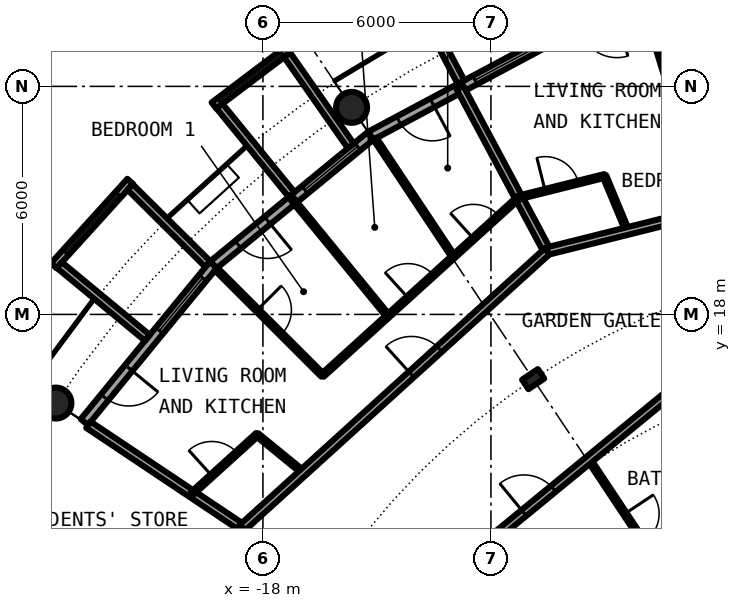
"""IFC4 building model, lengths in metres.
Left out: names, types, materials, properties, quantities, classifications, styles, units other than length and angle.
Written with IfcOpenShell. Run it as: python <this file> out.ifc"""

import sys

from ifc_helpers import new_model, si_unit, direction, frame, frame_2d, origin, origin_2d, place, context, subcontext, project, spatial, rectangle, circle, hollow_circle, i_section, extrude, element, fill, save


model = new_model("IFC4")
c1 = context("Model", 3, precision=1e-05, world=origin(), true_north=direction((0.0, 1.0)))
c2 = subcontext(c1, "Body", "Model", "MODEL_VIEW")
j1 = project(units=[si_unit("LENGTHUNIT", "METRE"), si_unit("PLANEANGLEUNIT", "RADIAN")], contexts=[c1])
p1 = place(None, origin())
s1 = spatial("IfcSite", under=j1, at=p1, CompositionType="ELEMENT")
p2 = place(p1, origin())
s2 = spatial("IfcBuilding", under=s1, at=p2, CompositionType="ELEMENT")
p3 = place(p2, frame((0.0, 0.0, 161.6)))
s3 = spatial("IfcBuildingStorey", under=s2, at=p3, CompositionType="ELEMENT", Elevation=161.6)
for number, where, z_axis, x_axis in (
    (1, (-15.667, 23.448, 0.0), (0.0, 0.0, 1.0), (1.0, 0.0, 0.0)),
    (2, (-23.448, 15.667, 0.0), (0.0, 0.0, 1.0), (1.0, 0.0, 0.0)),
):
    element("IfcColumn", number, at=place(p3, frame(where, z_axis=z_axis, x_axis=x_axis)), inside=s3, PredefinedType="COLUMN", context=c2, shape_type="SweptSolid", body=[
        extrude(hollow_circle(Radius=0.406, WallThickness=0.04, at=origin_2d()), origin(), (0.0, 0.0, 1.0), 3.05),
    ])
p4 = place(p3, frame((-10.889, 16.297, 0.0), z_axis=(0.0, 0.0, 1.0), x_axis=(-0.55557023302, 0.831469612303, 0.0)))
e3 = element("IfcColumn", 3, at=p4, inside=s3, PredefinedType="COLUMN", context=c2, shape_type="SweptSolid", body=[
    extrude(i_section(OverallWidth=0.3, OverallDepth=0.5, WebThickness=0.014, FlangeThickness=0.028, FilletRadius=0.027, at=origin_2d()), origin(), (0.0, 0.0, 1.0), 3.05),
])
p5 = place(p3, frame((-10.447, 25.222, 0.0), z_axis=(0.0, 0.0, 1.0), x_axis=(-0.881915646801, -0.471407246368, 0.0)))
e4 = element("IfcWall", 4, at=p5, inside=s3, PredefinedType="SOLIDWALL", context=c2, shape_type="SweptSolid", body=[
    extrude(rectangle(XDim=5.352, YDim=0.25, at=frame_2d((2.676, 0.0))), origin(), (0.0, 0.0, 1.0), 2.7),
])
p6 = place(p5, frame((0.441, 0.0, 0.3)))
e5 = element("IfcOpeningElement", 5, at=p6, cuts=e4, PredefinedType="OPENING", context=c2, shape_type="SweptSolid", body=[
    extrude(rectangle(XDim=1.8, YDim=2.1, at=frame_2d((0.9, 1.05))), frame((0.0, 0.135, 0.0), z_axis=(0.0, -1.0, 0.0), x_axis=(1.0, 0.0, 0.0)), (0.0, 0.0, 1.0), 0.27),
])
p7 = place(p5, frame((3.51, 0.0, 0.0)))
e6 = element("IfcOpeningElement", 6, at=p7, cuts=e4, PredefinedType="OPENING", context=c2, shape_type="SweptSolid", body=[
    extrude(rectangle(XDim=1.0, YDim=2.2, at=frame_2d((0.5, 1.1))), frame((0.0, 0.135, 0.0), z_axis=(0.0, -1.0, 0.0), x_axis=(1.0, 0.0, 0.0)), (0.0, 0.0, 1.0), 0.27),
])
p8 = place(p3, frame((-12.787, 24.113, -0.03), z_axis=(0.0, 0.0, 1.0), x_axis=(-0.468365282436, 0.883534924159, 0.0)))
e7 = element("IfcWall", 7, at=p8, inside=s3, PredefinedType="SOLIDWALL", context=c2, shape_type="SweptSolid", body=[
    extrude(rectangle(XDim=3.006, YDim=0.2, at=frame_2d((1.503, 0.0))), origin(), (0.0, 0.0, 1.0), 2.73),
])
p9 = place(p3, frame((-15.167, 22.699, 0.0), z_axis=(0.0, 0.0, 1.0), x_axis=(-0.773019449054, -0.634382322723, 0.0)))
e8 = element("IfcWall", 8, at=p9, inside=s3, PredefinedType="SOLIDWALL", context=c2, shape_type="SweptSolid", body=[
    extrude(rectangle(XDim=5.352, YDim=0.25, at=frame_2d((2.676, 0.0))), origin(), (0.0, 0.0, 1.0), 2.7),
])
p10 = place(p9, frame((0.441, 0.0, 0.3)))
e9 = element("IfcOpeningElement", 9, at=p10, cuts=e8, PredefinedType="OPENING", context=c2, shape_type="SweptSolid", body=[
    extrude(rectangle(XDim=1.8, YDim=2.1, at=frame_2d((0.9, 1.05))), frame((0.0, 0.135, 0.0), z_axis=(0.0, -1.0, 0.0), x_axis=(1.0, 0.0, 0.0)), (0.0, 0.0, 1.0), 0.27),
])
p11 = place(p9, frame((3.51, 0.0, 0.0)))
e10 = element("IfcOpeningElement", 10, at=p11, cuts=e8, PredefinedType="OPENING", context=c2, shape_type="SweptSolid", body=[
    extrude(rectangle(XDim=1.0, YDim=2.2, at=frame_2d((0.5, 1.1))), frame((0.0, 0.135, 0.0), z_axis=(0.0, -1.0, 0.0), x_axis=(1.0, 0.0, 0.0)), (0.0, 0.0, 1.0), 0.27),
])
p12 = place(p3, frame((-17.337, 24.972, -0.03), z_axis=(0.0, 0.0, 1.0), x_axis=(-0.797887588059, -0.602806268067, 0.0)))
e11 = element("IfcWall", 11, at=p12, inside=s3, PredefinedType="SOLIDWALL", context=c2, shape_type="SweptSolid", body=[
    extrude(rectangle(XDim=2.447, YDim=0.2, at=frame_2d((1.223, 0.0))), origin(), (0.0, 0.0, 1.0), 2.73),
])
p13 = place(p12, frame((0.183, 0.0, 0.33)))
e12 = element("IfcOpeningElement", 12, at=p13, cuts=e11, PredefinedType="OPENING", context=c2, shape_type="SweptSolid", body=[
    extrude(circle(Radius=1.04, at=frame_2d((1.04, 1.04))), frame((0.0, 0.11, 0.0), z_axis=(0.0, -1.0, 0.0), x_axis=(1.0, 0.0, 0.0)), (0.0, 0.0, 1.0), 0.22),
])
p14 = place(p3, frame((-15.688, 22.433, -0.03), z_axis=(0.0, 0.0, 1.0), x_axis=(-0.573260687834, 0.819373043115, 0.0)))
e13 = element("IfcWall", 13, at=p14, inside=s3, PredefinedType="SOLIDWALL", context=c2, shape_type="SweptSolid", body=[
    extrude(rectangle(XDim=2.925, YDim=0.2, at=frame_2d((1.463, 0.0))), origin(), (0.0, 0.0, 1.0), 2.73),
])
p15 = place(p3, frame((-17.246, 21.155, -0.03), z_axis=(0.0, 0.0, 1.0), x_axis=(-0.631741648902, 0.775179004516, 0.0)))
e14 = element("IfcWall", 14, at=p15, inside=s3, PredefinedType="SOLIDWALL", context=c2, shape_type="SweptSolid", body=[
    extrude(rectangle(XDim=3.006, YDim=0.2, at=frame_2d((1.503, 0.0))), origin(), (0.0, 0.0, 1.0), 2.73),
])
p16 = place(p3, frame((-19.304, 19.304, 0.0), z_axis=(0.0, 0.0, 1.0), x_axis=(-0.634382322723, -0.773019449054, 0.0)))
e15 = element("IfcWall", 15, at=p16, inside=s3, PredefinedType="SOLIDWALL", context=c2, shape_type="SweptSolid", body=[
    extrude(rectangle(XDim=5.352, YDim=0.25, at=frame_2d((2.676, 0.0))), origin(), (0.0, 0.0, 1.0), 2.7),
])
p17 = place(p16, frame((0.441, 0.0, 0.3)))
e16 = element("IfcOpeningElement", 16, at=p17, cuts=e15, PredefinedType="OPENING", context=c2, shape_type="SweptSolid", body=[
    extrude(rectangle(XDim=1.8, YDim=2.1, at=frame_2d((0.9, 1.05))), frame((0.0, 0.135, 0.0), z_axis=(0.0, -1.0, 0.0), x_axis=(1.0, 0.0, 0.0)), (0.0, 0.0, 1.0), 0.27),
])
p18 = place(p16, frame((3.51, 0.0, 0.0)))
e17 = element("IfcOpeningElement", 17, at=p18, cuts=e15, PredefinedType="OPENING", context=c2, shape_type="SweptSolid", body=[
    extrude(rectangle(XDim=1.0, YDim=2.2, at=frame_2d((0.5, 1.1))), frame((0.0, 0.135, 0.0), z_axis=(0.0, -1.0, 0.0), x_axis=(1.0, 0.0, 0.0)), (0.0, 0.0, 1.0), 0.27),
])
p19 = place(p3, frame((-21.493, 21.5, -0.03), z_axis=(0.0, 0.0, 1.0), x_axis=(-0.671506829416, -0.740998365753, 0.0)))
e18 = element("IfcWall", 18, at=p19, inside=s3, PredefinedType="SOLIDWALL", context=c2, shape_type="SweptSolid", body=[
    extrude(rectangle(XDim=2.993, YDim=0.2, at=frame_2d((1.497, 0.0))), origin(), (0.0, 0.0, 1.0), 2.73),
])
p20 = place(p19, frame((0.457, 0.0, 0.33)))
e19 = element("IfcOpeningElement", 19, at=p20, cuts=e18, PredefinedType="OPENING", context=c2, shape_type="SweptSolid", body=[
    extrude(circle(Radius=1.04, at=frame_2d((1.04, 1.04))), frame((0.0, 0.11, 0.0), z_axis=(0.0, -1.0, 0.0), x_axis=(1.0, 0.0, 0.0)), (0.0, 0.0, 1.0), 0.22),
])
p21 = place(p3, frame((-19.45, 19.323, -0.03), z_axis=(0.0, 0.0, 1.0), x_axis=(-0.709727076896, 0.704476739375, 0.0)))
e20 = element("IfcWall", 20, at=p21, inside=s3, PredefinedType="SOLIDWALL", context=c2, shape_type="SweptSolid", body=[
    extrude(rectangle(XDim=2.883, YDim=0.2, at=frame_2d((1.441, 0.0))), origin(), (0.0, 0.0, 1.0), 2.73),
])
p22 = place(p3, frame((-21.041, 17.384, -0.03), z_axis=(0.0, 0.0, 1.0), x_axis=(-0.770784861449, 0.63709551667, 0.0)))
e21 = element("IfcWall", 21, at=p22, inside=s3, PredefinedType="SOLIDWALL", context=c2, shape_type="SweptSolid", body=[
    extrude(rectangle(XDim=3.006, YDim=0.2, at=frame_2d((1.503, 0.0))), origin(), (0.0, 0.0, 1.0), 2.73),
])
p23 = place(p3, frame((-9.013, 21.642, 0.0), z_axis=(0.0, 0.0, 1.0), x_axis=(0.384228756538, -0.923237923099, 0.0)))
e22 = element("IfcWall", 22, at=p23, inside=s3, PredefinedType="PARTITIONING", context=c2, shape_type="SweptSolid", body=[
    extrude(rectangle(XDim=1.569, YDim=0.1, at=frame_2d((0.785, 0.0))), origin(), (0.0, 0.0, 1.0), 2.7),
])
p24 = place(p3, frame((-22.595, 15.098, 0.0), z_axis=(0.0, 0.0, 1.0), x_axis=(0.831387096605, -0.55569370664, 0.0)))
e23 = element("IfcWall", 23, at=p24, inside=s3, PredefinedType="PARTITIONING", context=c2, shape_type="SweptSolid", body=[
    extrude(rectangle(XDim=4.875, YDim=0.2, at=frame_2d((2.438, 0.0))), origin(), (0.0, 0.0, 1.0), 2.7),
])
p25 = place(p3, frame((-19.234, 19.197, 0.0), z_axis=(0.0, 0.0, 1.0), x_axis=(0.707722727509, -0.706490297858, 0.0)))
e24 = element("IfcWall", 24, at=p25, inside=s3, PredefinedType="PARTITIONING", context=c2, shape_type="SweptSolid", body=[
    extrude(rectangle(XDim=3.962, YDim=0.1, at=frame_2d((1.981, 0.0))), origin(), (0.0, 0.0, 1.0), 2.7),
])
p26 = place(p25, frame((1.531, 0.0, 0.0)))
e25 = element("IfcOpeningElement", 25, at=p26, cuts=e24, PredefinedType="OPENING", context=c2, shape_type="SweptSolid", body=[
    extrude(rectangle(XDim=0.9, YDim=2.3, at=frame_2d((0.45, 1.15))), frame((0.0, 0.06, 0.0), z_axis=(0.0, -1.0, 0.0), x_axis=(1.0, 0.0, 0.0)), (0.0, 0.0, 1.0), 0.12),
])
p27 = place(p3, frame((-18.154, 14.834, 0.0), z_axis=(0.0, 0.0, 1.0), x_axis=(0.774345345452, -0.632763214779, 0.0)))
e26 = element("IfcWall", 26, at=p27, inside=s3, PredefinedType="PARTITIONING", context=c2, shape_type="SweptSolid", body=[
    extrude(rectangle(XDim=1.569, YDim=0.1, at=frame_2d((0.785, 0.0))), origin(), (0.0, 0.0, 1.0), 2.7),
])
p28 = place(p3, frame((-17.219, 21.023, 0.0), z_axis=(0.0, 0.0, 1.0), x_axis=(0.633590098448, -0.773668913133, 0.0)))
e27 = element("IfcWall", 27, at=p28, inside=s3, PredefinedType="PARTITIONING", context=c2, shape_type="SweptSolid", body=[
    extrude(rectangle(XDim=3.962, YDim=0.1, at=frame_2d((1.981, 0.0))), origin(), (0.0, 0.0, 1.0), 2.7),
])
p29 = place(p3, frame((-15.054, 22.624, 0.0), z_axis=(0.0, 0.0, 1.0), x_axis=(0.553823887887, -0.83263383381, 0.0)))
e28 = element("IfcWall", 28, at=p29, inside=s3, PredefinedType="PARTITIONING", context=c2, shape_type="SweptSolid", body=[
    extrude(rectangle(XDim=3.73, YDim=0.1, at=frame_2d((1.865, 0.0))), origin(), (0.0, 0.0, 1.0), 2.7),
])
p30 = place(p3, frame((-12.814, 23.964, 0.0), z_axis=(0.0, 0.0, 1.0), x_axis=(0.471388689095, -0.881925565903, 0.0)))
e29 = element("IfcWall", 29, at=p30, inside=s3, PredefinedType="PARTITIONING", context=c2, shape_type="SweptSolid", body=[
    extrude(rectangle(XDim=4.875, YDim=0.2, at=frame_2d((2.438, 0.0))), origin(), (0.0, 0.0, 1.0), 2.7),
])
p31 = place(p3, frame((-9.421, 14.18, 0.0), z_axis=(0.0, 0.0, 1.0), x_axis=(0.553303732327, -0.832979579457, 0.0)))
e30 = element("IfcWall", 30, at=p31, inside=s3, PredefinedType="PARTITIONING", context=c2, shape_type="SweptSolid", body=[
    extrude(rectangle(XDim=4.319, YDim=0.1, at=frame_2d((2.16, 0.0))), origin(), (0.0, 0.0, 1.0), 2.7),
])
p32 = place(p31, frame((1.71, 0.0, 0.0)))
e31 = element("IfcOpeningElement", 31, at=p32, cuts=e30, PredefinedType="OPENING", context=c2, shape_type="SweptSolid", body=[
    extrude(rectangle(XDim=0.9, YDim=2.3, at=frame_2d((0.45, 1.15))), frame((0.0, 0.06, 0.0), z_axis=(0.0, -1.0, 0.0), x_axis=(1.0, 0.0, 0.0)), (0.0, 0.0, 1.0), 0.12),
])
p33 = place(p3, frame((-7.917, 25.996, 0.0), z_axis=(0.0, 0.0, 1.0), x_axis=(0.291291575636, -0.956634317785, 0.0)))
e32 = element("IfcWall", 32, at=p33, inside=s3, PredefinedType="PARTITIONING", context=c2, shape_type="SweptSolid", body=[
    extrude(rectangle(XDim=3.962, YDim=0.1, at=frame_2d((1.981, 0.0))), origin(), (0.0, 0.0, 1.0), 2.7),
])
p34 = place(p33, frame((1.531, 0.0, 0.0)))
e33 = element("IfcOpeningElement", 33, at=p34, cuts=e32, PredefinedType="OPENING", context=c2, shape_type="SweptSolid", body=[
    extrude(rectangle(XDim=0.9, YDim=2.3, at=frame_2d((0.45, 1.15))), frame((0.0, 0.06, 0.0), z_axis=(0.0, -1.0, 0.0), x_axis=(1.0, 0.0, 0.0)), (0.0, 0.0, 1.0), 0.12),
])
p35 = place(p3, frame((-14.717, 9.834, 0.0), z_axis=(0.0, 0.0, 1.0), x_axis=(0.773034536097, 0.634363938131, 0.0)))
e34 = element("IfcWall", 34, at=p35, inside=s3, PredefinedType="PARTITIONING", context=c2, shape_type="SweptSolid", body=[
    extrude(rectangle(XDim=10.277, YDim=0.2, at=frame_2d((5.138, 0.0))), origin(), (0.0, 0.0, 1.0), 2.7),
])
p36 = place(p35, frame((4.638, 0.0, 0.0)))
e35 = element("IfcOpeningElement", 35, at=p36, cuts=e34, PredefinedType="OPENING", context=c2, shape_type="SweptSolid", body=[
    extrude(rectangle(XDim=1.0, YDim=2.3, at=frame_2d((0.5, 1.15))), frame((0.0, 0.11, 0.0), z_axis=(0.0, -1.0, 0.0), x_axis=(1.0, 0.0, 0.0)), (0.0, 0.0, 1.0), 0.22),
])
p37 = place(p3, frame((-18.542, 12.389, 0.0), z_axis=(0.0, 0.0, 1.0), x_axis=(0.740947367223, 0.671563101283, 0.0)))
e36 = element("IfcWall", 36, at=p37, inside=s3, PredefinedType="PARTITIONING", context=c2, shape_type="SweptSolid", body=[
    extrude(rectangle(XDim=10.837, YDim=0.2, at=frame_2d((5.419, 0.0))), origin(), (0.0, 0.0, 1.0), 2.7),
])
p38 = place(p37, frame((6.002, 0.0, 0.0)))
e37 = element("IfcOpeningElement", 37, at=p38, cuts=e36, PredefinedType="OPENING", context=c2, shape_type="SweptSolid", body=[
    extrude(rectangle(XDim=1.0, YDim=2.3, at=frame_2d((0.5, 1.15))), frame((0.0, 0.11, 0.0), z_axis=(0.0, -1.0, 0.0), x_axis=(1.0, 0.0, 0.0)), (0.0, 0.0, 1.0), 0.22),
])
p39 = place(p3, frame((-10.512, 19.667, 0.0), z_axis=(0.0, 0.0, 1.0), x_axis=(0.970086843848, 0.242758141765, 0.0)))
e38 = element("IfcWall", 38, at=p39, inside=s3, PredefinedType="PARTITIONING", context=c2, shape_type="SweptSolid", body=[
    extrude(rectangle(XDim=10.842, YDim=0.2, at=frame_2d((5.421, 0.0))), origin(), (0.0, 0.0, 1.0), 2.7),
])
p40 = place(p39, frame((6.002, 0.0, 0.0)))
e39 = element("IfcOpeningElement", 39, at=p40, cuts=e38, PredefinedType="OPENING", context=c2, shape_type="SweptSolid", body=[
    extrude(rectangle(XDim=1.0, YDim=2.3, at=frame_2d((0.5, 1.15))), frame((0.0, 0.11, 0.0), z_axis=(0.0, -1.0, 0.0), x_axis=(1.0, 0.0, 0.0)), (0.0, 0.0, 1.0), 0.22),
])
p41 = place(p3, frame((-19.307, 10.935, 0.0), z_axis=(0.0, 0.0, 1.0), x_axis=(0.465605550524, 0.884992356646, 0.0)))
e40 = element("IfcWall", 40, at=p41, inside=s3, PredefinedType="PARTITIONING", context=c2, shape_type="SweptSolid", body=[
    extrude(rectangle(XDim=1.643, YDim=0.2, at=frame_2d((0.821, 0.0))), origin(), (0.0, 0.0, 1.0), 2.7),
])
p42 = place(p3, frame((-19.871, 13.28, 0.0), z_axis=(0.0, 0.0, 1.0), x_axis=(0.741127434804, 0.671364376014, 0.0)))
e41 = element("IfcWall", 41, at=p42, inside=s3, PredefinedType="PARTITIONING", context=c2, shape_type="SweptSolid", body=[
    extrude(rectangle(XDim=2.324, YDim=0.1, at=frame_2d((1.162, 0.0))), origin(), (0.0, 0.0, 1.0), 2.7),
])
p43 = place(p42, frame((0.709, 0.0, 0.0)))
e42 = element("IfcOpeningElement", 42, at=p43, cuts=e41, PredefinedType="OPENING", context=c2, shape_type="SweptSolid", body=[
    extrude(rectangle(XDim=0.9, YDim=2.3, at=frame_2d((0.45, 1.15))), frame((0.0, 0.06, 0.0), z_axis=(0.0, -1.0, 0.0), x_axis=(1.0, 0.0, 0.0)), (0.0, 0.0, 1.0), 0.12),
])
p44 = place(p3, frame((-16.43, 16.398, 0.0), z_axis=(0.0, 0.0, 1.0), x_axis=(0.740990766872, 0.671515214578, 0.0)))
e43 = element("IfcWall", 43, at=p44, inside=s3, PredefinedType="PARTITIONING", context=c2, shape_type="SweptSolid", body=[
    extrude(rectangle(XDim=6.965, YDim=0.1, at=frame_2d((3.482, 0.0))), origin(), (0.0, 0.0, 1.0), 2.7),
])
p45 = place(p44, frame((3.035, 0.0, 0.0)))
e44 = element("IfcOpeningElement", 44, at=p45, cuts=e43, PredefinedType="OPENING", context=c2, shape_type="SweptSolid", body=[
    extrude(rectangle(XDim=0.9, YDim=2.3, at=frame_2d((0.45, 1.15))), frame((0.0, 0.06, 0.0), z_axis=(0.0, -1.0, 0.0), x_axis=(1.0, 0.0, 0.0)), (0.0, 0.0, 1.0), 0.12),
])
p46 = place(p44, frame((5.357, 0.0, 0.0)))
e45 = element("IfcOpeningElement", 45, at=p46, cuts=e43, PredefinedType="OPENING", context=c2, shape_type="SweptSolid", body=[
    extrude(rectangle(XDim=0.9, YDim=2.3, at=frame_2d((0.45, 1.15))), frame((0.0, 0.06, 0.0), z_axis=(0.0, -1.0, 0.0), x_axis=(1.0, 0.0, 0.0)), (0.0, 0.0, 1.0), 0.12),
])
p47 = place(p3, frame((-11.266, 21.078, 0.0), z_axis=(0.0, 0.0, 1.0), x_axis=(0.970074595874, 0.242807080706, 0.0)))
e46 = element("IfcWall", 46, at=p47, inside=s3, PredefinedType="PARTITIONING", context=c2, shape_type="SweptSolid", body=[
    extrude(rectangle(XDim=2.328, YDim=0.1, at=frame_2d((1.164, 0.0))), origin(), (0.0, 0.0, 1.0), 2.7),
])
p48 = place(p47, frame((0.714, 0.0, 0.0)))
e47 = element("IfcOpeningElement", 47, at=p48, cuts=e46, PredefinedType="OPENING", context=c2, shape_type="SweptSolid", body=[
    extrude(rectangle(XDim=0.9, YDim=2.3, at=frame_2d((0.45, 1.15))), frame((0.0, 0.06, 0.0), z_axis=(0.0, -1.0, 0.0), x_axis=(1.0, 0.0, 0.0)), (0.0, 0.0, 1.0), 0.12),
])
p49 = place(p6, origin())
e48 = element("IfcWindow", 48, at=p49, inside=s3, PartitioningType="SINGLE_PANEL", PredefinedType="WINDOW", context=c2, shape_type="SweptSolid", body=[
    extrude(rectangle(XDim=1.8, YDim=2.1, at=frame_2d((0.9, 1.05))), frame((0.0, 0.03, 0.0), z_axis=(0.0, -1.0, 0.0), x_axis=(1.0, 0.0, 0.0)), (0.0, 0.0, 1.0), 0.06),
])
fill(e5, e48)
p50 = place(p7, origin())
e49 = element("IfcDoor", 49, at=p50, inside=s3, OperationType="SINGLE_SWING_LEFT", PredefinedType="DOOR", context=c2, shape_type="SweptSolid", body=[
    extrude(rectangle(XDim=1.0, YDim=2.2, at=frame_2d((0.5, 1.1))), frame((0.0, 0.025, 0.0), z_axis=(0.0, -1.0, 0.0), x_axis=(1.0, 0.0, 0.0)), (0.0, 0.0, 1.0), 0.05),
])
fill(e6, e49)
p51 = place(p10, origin())
e50 = element("IfcWindow", 50, at=p51, inside=s3, PartitioningType="SINGLE_PANEL", PredefinedType="WINDOW", context=c2, shape_type="SweptSolid", body=[
    extrude(rectangle(XDim=1.8, YDim=2.1, at=frame_2d((0.9, 1.05))), frame((0.0, 0.03, 0.0), z_axis=(0.0, -1.0, 0.0), x_axis=(1.0, 0.0, 0.0)), (0.0, 0.0, 1.0), 0.06),
])
fill(e9, e50)
p52 = place(p13, origin())
e51 = element("IfcWindow", 51, at=p52, inside=s3, PartitioningType="SINGLE_PANEL", PredefinedType="WINDOW", context=c2, shape_type="SweptSolid", body=[
    extrude(circle(Radius=1.04, at=frame_2d((1.04, 1.04))), frame((0.0, 0.03, 0.0), z_axis=(0.0, -1.0, 0.0), x_axis=(1.0, 0.0, 0.0)), (0.0, 0.0, 1.0), 0.06),
])
fill(e12, e51)
p53 = place(p11, origin())
e52 = element("IfcDoor", 52, at=p53, inside=s3, OperationType="SINGLE_SWING_LEFT", PredefinedType="DOOR", context=c2, shape_type="SweptSolid", body=[
    extrude(rectangle(XDim=1.0, YDim=2.2, at=frame_2d((0.5, 1.1))), frame((0.0, 0.025, 0.0), z_axis=(0.0, -1.0, 0.0), x_axis=(1.0, 0.0, 0.0)), (0.0, 0.0, 1.0), 0.05),
])
fill(e10, e52)
p54 = place(p17, origin())
e53 = element("IfcWindow", 53, at=p54, inside=s3, PartitioningType="SINGLE_PANEL", PredefinedType="WINDOW", context=c2, shape_type="SweptSolid", body=[
    extrude(rectangle(XDim=1.8, YDim=2.1, at=frame_2d((0.9, 1.05))), frame((0.0, 0.03, 0.0), z_axis=(0.0, -1.0, 0.0), x_axis=(1.0, 0.0, 0.0)), (0.0, 0.0, 1.0), 0.06),
])
fill(e16, e53)
p55 = place(p20, origin())
e54 = element("IfcWindow", 54, at=p55, inside=s3, PartitioningType="SINGLE_PANEL", PredefinedType="WINDOW", context=c2, shape_type="SweptSolid", body=[
    extrude(circle(Radius=1.04, at=frame_2d((1.04, 1.04))), frame((0.0, 0.03, 0.0), z_axis=(0.0, -1.0, 0.0), x_axis=(1.0, 0.0, 0.0)), (0.0, 0.0, 1.0), 0.06),
])
fill(e19, e54)
p56 = place(p18, origin())
e55 = element("IfcDoor", 55, at=p56, inside=s3, OperationType="SINGLE_SWING_LEFT", PredefinedType="DOOR", context=c2, shape_type="SweptSolid", body=[
    extrude(rectangle(XDim=1.0, YDim=2.2, at=frame_2d((0.5, 1.1))), frame((0.0, 0.025, 0.0), z_axis=(0.0, -1.0, 0.0), x_axis=(1.0, 0.0, 0.0)), (0.0, 0.0, 1.0), 0.05),
])
fill(e17, e55)
p57 = place(p48, origin())
e56 = element("IfcDoor", 56, at=p57, inside=s3, OperationType="SINGLE_SWING_RIGHT", PredefinedType="DOOR", context=c2, shape_type="SweptSolid", body=[
    extrude(rectangle(XDim=0.9, YDim=2.3, at=frame_2d((0.45, 1.15))), frame((0.0, 0.025, 0.0), z_axis=(0.0, -1.0, 0.0), x_axis=(1.0, 0.0, 0.0)), (0.0, 0.0, 1.0), 0.05),
])
fill(e47, e56)
p58 = place(p38, origin())
e57 = element("IfcDoor", 57, at=p58, inside=s3, OperationType="SINGLE_SWING_RIGHT", PredefinedType="DOOR", context=c2, shape_type="SweptSolid", body=[
    extrude(rectangle(XDim=1.0, YDim=2.3, at=frame_2d((0.5, 1.15))), frame((0.0, 0.025, 0.0), z_axis=(0.0, -1.0, 0.0), x_axis=(1.0, 0.0, 0.0)), (0.0, 0.0, 1.0), 0.05),
])
fill(e37, e57)
p59 = place(p43, origin())
e58 = element("IfcDoor", 58, at=p59, inside=s3, OperationType="SINGLE_SWING_LEFT", PredefinedType="DOOR", context=c2, shape_type="SweptSolid", body=[
    extrude(rectangle(XDim=0.9, YDim=2.3, at=frame_2d((0.45, 1.15))), frame((0.0, 0.025, 0.0), z_axis=(0.0, -1.0, 0.0), x_axis=(1.0, 0.0, 0.0)), (0.0, 0.0, 1.0), 0.05),
])
fill(e42, e58)
p60 = place(p26, origin())
e59 = element("IfcDoor", 59, at=p60, inside=s3, OperationType="SINGLE_SWING_LEFT", PredefinedType="DOOR", context=c2, shape_type="SweptSolid", body=[
    extrude(rectangle(XDim=0.9, YDim=2.3, at=frame_2d((0.45, 1.15))), frame((0.0, 0.025, 0.0), z_axis=(0.0, -1.0, 0.0), x_axis=(1.0, 0.0, 0.0)), (0.0, 0.0, 1.0), 0.05),
])
fill(e25, e59)
p61 = place(p45, origin())
e60 = element("IfcDoor", 60, at=p61, inside=s3, OperationType="SINGLE_SWING_RIGHT", PredefinedType="DOOR", context=c2, shape_type="SweptSolid", body=[
    extrude(rectangle(XDim=0.9, YDim=2.3, at=frame_2d((0.45, 1.15))), frame((0.0, 0.025, 0.0), z_axis=(0.0, -1.0, 0.0), x_axis=(1.0, 0.0, 0.0)), (0.0, 0.0, 1.0), 0.05),
])
fill(e44, e60)
p62 = place(p46, origin())
e61 = element("IfcDoor", 61, at=p62, inside=s3, OperationType="SINGLE_SWING_RIGHT", PredefinedType="DOOR", context=c2, shape_type="SweptSolid", body=[
    extrude(rectangle(XDim=0.9, YDim=2.3, at=frame_2d((0.45, 1.15))), frame((0.0, 0.025, 0.0), z_axis=(0.0, -1.0, 0.0), x_axis=(1.0, 0.0, 0.0)), (0.0, 0.0, 1.0), 0.05),
])
fill(e45, e61)
p63 = place(p36, origin())
e62 = element("IfcDoor", 62, at=p63, inside=s3, OperationType="SINGLE_SWING_LEFT", PredefinedType="DOOR", context=c2, shape_type="SweptSolid", body=[
    extrude(rectangle(XDim=1.0, YDim=2.3, at=frame_2d((0.5, 1.15))), frame((0.0, 0.025, 0.0), z_axis=(0.0, -1.0, 0.0), x_axis=(1.0, 0.0, 0.0)), (0.0, 0.0, 1.0), 0.05),
])
fill(e35, e62)
p64 = place(p32, origin())
e63 = element("IfcDoor", 63, at=p64, inside=s3, OperationType="SINGLE_SWING_RIGHT", PredefinedType="DOOR", context=c2, shape_type="SweptSolid", body=[
    extrude(rectangle(XDim=0.9, YDim=2.3, at=frame_2d((0.45, 1.15))), frame((0.0, 0.025, 0.0), z_axis=(0.0, -1.0, 0.0), x_axis=(1.0, 0.0, 0.0)), (0.0, 0.0, 1.0), 0.05),
])
fill(e31, e63)
save(model, sys.argv[1])
